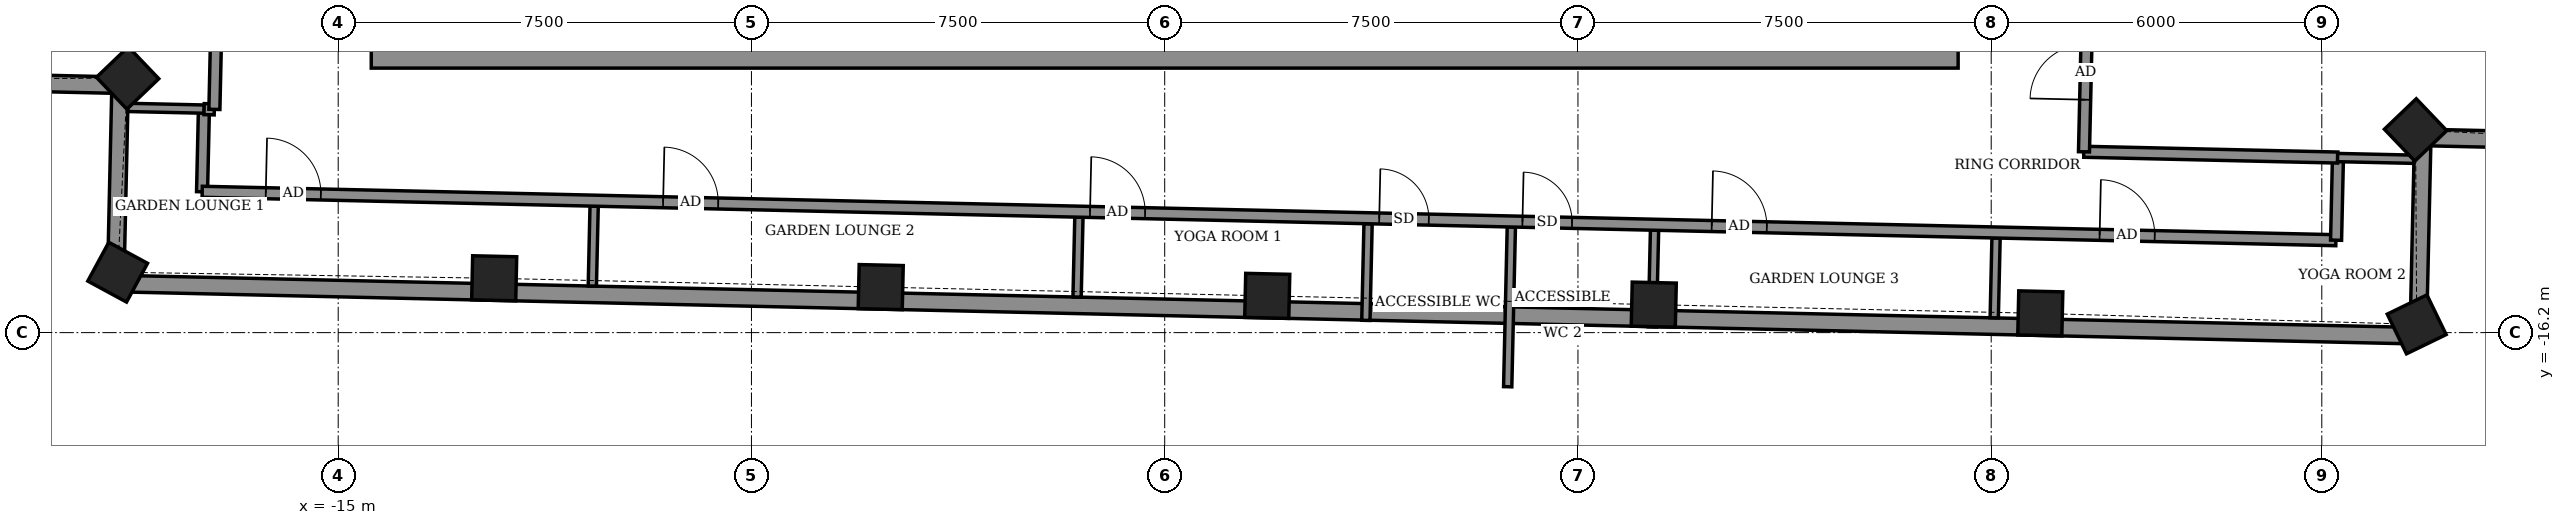
"""IFC4 building model, lengths in metres.
Left out: names, types, materials, properties, quantities, classifications, styles, units other than length and angle.
Written with IfcOpenShell. Run it as: python <this file> out.ifc"""

import sys

from ifc_helpers import new_model, si_unit, direction, frame, frame_2d, origin, origin_2d, place, context, subcontext, project, spatial, rectangle, extrude, element, fill, save


model = new_model("IFC4")
c1 = context("Model", 3, precision=1e-05, world=origin(), true_north=direction((0.0, 1.0)))
c2 = subcontext(c1, "Body", "Model", "MODEL_VIEW")
j1 = project(units=[si_unit("LENGTHUNIT", "METRE"), si_unit("PLANEANGLEUNIT", "RADIAN")], contexts=[c1])
p1 = place(None, origin())
s1 = spatial("IfcSite", under=j1, at=p1, CompositionType="ELEMENT")
p2 = place(p1, origin())
s2 = spatial("IfcBuilding", under=s1, at=p2, CompositionType="ELEMENT")
p3 = place(p2, frame((0.0, 0.0, 350.7)))
s3 = spatial("IfcBuildingStorey", under=s2, at=p3, CompositionType="ELEMENT", Elevation=350.7)
for number, where, z_axis, x_axis in (
    (1, (-18.822, -11.58, -0.55), (0.0, 0.0, 1.0), (0.691, -0.723, 0.0)),
    (2, (-19.002, -15.103, -0.55), (0.0, 0.0, 1.0), (0.879, -0.477, 0.0)),
    (3, (-12.169, -15.214, -0.55), (0.0, 0.0, 1.0), (1.0, -0.023, 0.0)),
    (4, (-5.154, -15.374, -0.55), (0.0, 0.0, 1.0), (1.0, -0.023, 0.0)),
    (5, (1.861, -15.533, -0.55), (0.0, 0.0, 1.0), (1.0, -0.023, 0.0)),
    (6, (8.876, -15.692, -0.55), (0.0, 0.0, 1.0), (1.0, -0.023, 0.0)),
    (7, (15.891, -15.851, -0.55), (0.0, 0.0, 1.0), (1.0, -0.023, 0.0)),
    (8, (22.722, -16.05, -0.55), (0.0, 0.0, 1.0), (0.9, 0.436, 0.0)),
    (9, (22.702, -12.522, -0.55), (0.0, 0.0, 1.0), (0.723, 0.691, 0.0)),
):
    element("IfcColumn", number, at=place(p3, frame(where, z_axis=z_axis, x_axis=x_axis)), inside=s3, PredefinedType="COLUMN", context=c2, shape_type="SweptSolid", body=[
        extrude(rectangle(XDim=0.8, YDim=0.8, at=origin_2d()), origin(), (0.0, 0.0, 1.0), 3.6),
    ])
p4 = place(p3, frame((-22.557, -11.628, 0.0), z_axis=(0.0, 0.0, 1.0), x_axis=(0.999740327787, -0.022787650101, 0.0)))
e10 = element("IfcWall", 10, at=p4, inside=s3, PredefinedType="SOLIDWALL", context=c2, shape_type="SweptSolid", body=[
    extrude(rectangle(XDim=3.6, YDim=0.3, at=frame_2d((1.8, 0.0))), origin(), (0.0, 0.0, 1.0), 2.55),
])
p5 = place(p3, frame((-18.958, -11.71, 0.0), z_axis=(0.0, 0.0, 1.0), x_axis=(-0.022514980321, -0.999746505701, 0.0)))
e11 = element("IfcWall", 11, at=p5, inside=s3, PredefinedType="SOLIDWALL", context=c2, shape_type="SweptSolid", body=[
    extrude(rectangle(XDim=3.6, YDim=0.3, at=frame_2d((1.8, 0.0))), origin(), (0.0, 0.0, 1.0), 2.55),
])
p6 = place(p3, frame((-19.039, -15.309, 0.0), z_axis=(0.0, 0.0, 1.0), x_axis=(0.999742787513, -0.022679480066, 0.0)))
e12 = element("IfcWall", 12, at=p6, inside=s3, PredefinedType="SOLIDWALL", context=c2, shape_type="SweptSolid", body=[
    extrude(rectangle(XDim=41.8, YDim=0.3, at=frame_2d((20.9, 0.0))), origin(), (0.0, 0.0, 1.0), 2.5),
])
p7 = place(p3, frame((22.75, -16.257, 0.0), z_axis=(0.0, 0.0, 1.0), x_axis=(0.02278610514, 0.999740363001, 0.0)))
e13 = element("IfcWall", 13, at=p7, inside=s3, PredefinedType="SOLIDWALL", context=c2, shape_type="SweptSolid", body=[
    extrude(rectangle(XDim=3.6, YDim=0.3, at=frame_2d((1.8, 0.0))), origin(), (0.0, 0.0, 1.0), 2.55),
])
p8 = place(p3, frame((22.832, -12.658, 0.0), z_axis=(0.0, 0.0, 1.0), x_axis=(0.999740327787, -0.022787650101, 0.0)))
e14 = element("IfcWall", 14, at=p8, inside=s3, PredefinedType="SOLIDWALL", context=c2, shape_type="SweptSolid", body=[
    extrude(rectangle(XDim=3.6, YDim=0.3, at=frame_2d((1.8, 0.0))), origin(), (0.0, 0.0, 1.0), 2.55),
])
p9 = place(p3, frame((6.225, -17.182, 0.0), z_axis=(0.0, 0.0, 1.0), x_axis=(0.022732880677, 0.999741574676, 0.0)))
e15 = element("IfcWall", 15, at=p9, inside=s3, PredefinedType="PARTITIONING", context=c2, shape_type="SweptSolid", body=[
    extrude(rectangle(XDim=2.9, YDim=0.15, at=frame_2d((1.45, 0.0))), origin(), (0.0, 0.0, 1.0), 2.5),
])
p10 = place(p3, frame((3.651, -15.978, 0.0), z_axis=(0.0, 0.0, 1.0), x_axis=(0.022822561686, 0.999739531417, 0.0)))
e16 = element("IfcWall", 16, at=p10, inside=s3, PredefinedType="PARTITIONING", context=c2, shape_type="SweptSolid", body=[
    extrude(rectangle(XDim=1.754, YDim=0.15, at=frame_2d((0.877, 0.0))), origin(), (0.0, 0.0, 1.0), 2.5),
])
p11 = place(p3, frame((8.85, -16.096, 0.0), z_axis=(0.0, 0.0, 1.0), x_axis=(0.022683471548, 0.999742696957, 0.0)))
e17 = element("IfcWall", 17, at=p11, inside=s3, PredefinedType="PARTITIONING", context=c2, shape_type="SweptSolid", body=[
    extrude(rectangle(XDim=1.754, YDim=0.15, at=frame_2d((0.877, 0.0))), origin(), (0.0, 0.0, 1.0), 3.05),
])
for number, where, z_axis, x_axis in (
    (18, (-10.388, -15.355, 0.0), (0.0, 0.0, 1.0), (0.023, 1.0, 0.0)),
    (19, (-1.59, -15.555, 0.0), (0.0, 0.0, 1.0), (0.023, 1.0, 0.0)),
):
    element("IfcWall", number, at=place(p3, frame(where, z_axis=z_axis, x_axis=x_axis)), inside=s3, PredefinedType="PARTITIONING", context=c2, shape_type="SweptSolid", body=[
        extrude(rectangle(XDim=1.45, YDim=0.15, at=frame_2d((0.725, 0.0))), origin(), (0.0, 0.0, 1.0), 2.5),
    ])
p12 = place(p3, frame((15.055, -15.932, 0.0), z_axis=(0.0, 0.0, 1.0), x_axis=(0.022740537333, 0.999741400544, 0.0)))
e20 = element("IfcWall", 20, at=p12, inside=s3, PredefinedType="PARTITIONING", context=c2, shape_type="SweptSolid", body=[
    extrude(rectangle(XDim=1.449, YDim=0.15, at=frame_2d((0.725, 0.0))), origin(), (0.0, 0.0, 1.0), 2.5),
])
p13 = place(p3, frame((-17.471, -13.644, 0.0), z_axis=(0.0, 0.0, 1.0), x_axis=(0.022617910375, 0.999744182344, 0.0)))
e21 = element("IfcWall", 21, at=p13, inside=s3, PredefinedType="PARTITIONING", context=c2, shape_type="SweptSolid", body=[
    extrude(rectangle(XDim=1.5, YDim=0.2, at=frame_2d((0.75, 0.0))), origin(), (0.0, 0.0, 1.0), 3.05),
])
p14 = place(p3, frame((-17.468, -13.644, 0.0), z_axis=(0.0, 0.0, 1.0), x_axis=(0.999742531431, -0.022690765715, 0.0)))
e22 = element("IfcWall", 22, at=p14, inside=s3, PredefinedType="PARTITIONING", context=c2, shape_type="SweptSolid", body=[
    extrude(rectangle(XDim=38.734, YDim=0.2, at=frame_2d((19.367, 0.0))), origin(), (0.0, 0.0, 1.0), 3.05),
])
p15 = place(p14, frame((1.154, 0.0, 0.0)))
e23 = element("IfcOpeningElement", 23, at=p15, cuts=e22, PredefinedType="OPENING", context=c2, shape_type="SweptSolid", body=[
    extrude(rectangle(XDim=1.0, YDim=2.1, at=frame_2d((0.5, 1.05))), frame((0.0, 0.11, 0.0), z_axis=(0.0, -1.0, 0.0), x_axis=(1.0, 0.0, 0.0)), (0.0, 0.0, 1.0), 0.22),
])
p16 = place(p14, frame((8.367, 0.0, 0.0)))
e24 = element("IfcOpeningElement", 24, at=p16, cuts=e22, PredefinedType="OPENING", context=c2, shape_type="SweptSolid", body=[
    extrude(rectangle(XDim=1.0, YDim=2.1, at=frame_2d((0.5, 1.05))), frame((0.0, 0.11, 0.0), z_axis=(0.0, -1.0, 0.0), x_axis=(1.0, 0.0, 0.0)), (0.0, 0.0, 1.0), 0.22),
])
p17 = place(p14, frame((16.117, 0.0, 0.0)))
e25 = element("IfcOpeningElement", 25, at=p17, cuts=e22, PredefinedType="OPENING", context=c2, shape_type="SweptSolid", body=[
    extrude(rectangle(XDim=1.0, YDim=2.1, at=frame_2d((0.5, 1.05))), frame((0.0, 0.11, 0.0), z_axis=(0.0, -1.0, 0.0), x_axis=(1.0, 0.0, 0.0)), (0.0, 0.0, 1.0), 0.22),
])
p18 = place(p14, frame((21.367, 0.0, 0.0)))
e26 = element("IfcOpeningElement", 26, at=p18, cuts=e22, PredefinedType="OPENING", context=c2, shape_type="SweptSolid", body=[
    extrude(rectangle(XDim=0.9, YDim=2.1, at=frame_2d((0.45, 1.05))), frame((0.0, 0.11, 0.0), z_axis=(0.0, -1.0, 0.0), x_axis=(1.0, 0.0, 0.0)), (0.0, 0.0, 1.0), 0.22),
])
p19 = place(p14, frame((27.403, 0.0, 0.0)))
e27 = element("IfcOpeningElement", 27, at=p19, cuts=e22, PredefinedType="OPENING", context=c2, shape_type="SweptSolid", body=[
    extrude(rectangle(XDim=1.0, YDim=2.1, at=frame_2d((0.5, 1.05))), frame((0.0, 0.11, 0.0), z_axis=(0.0, -1.0, 0.0), x_axis=(1.0, 0.0, 0.0)), (0.0, 0.0, 1.0), 0.22),
])
p20 = place(p14, frame((23.967, 0.0, 0.0)))
e28 = element("IfcOpeningElement", 28, at=p20, cuts=e22, PredefinedType="OPENING", context=c2, shape_type="SweptSolid", body=[
    extrude(rectangle(XDim=0.9, YDim=2.1, at=frame_2d((0.45, 1.05))), frame((0.0, 0.11, 0.0), z_axis=(0.0, -1.0, 0.0), x_axis=(1.0, 0.0, 0.0)), (0.0, 0.0, 1.0), 0.22),
])
p21 = place(p14, frame((34.445, 0.0, 0.0)))
e29 = element("IfcOpeningElement", 29, at=p21, cuts=e22, PredefinedType="OPENING", context=c2, shape_type="SweptSolid", body=[
    extrude(rectangle(XDim=1.0, YDim=2.1, at=frame_2d((0.5, 1.05))), frame((0.0, 0.11, 0.0), z_axis=(0.0, -1.0, 0.0), x_axis=(1.0, 0.0, 0.0)), (0.0, 0.0, 1.0), 0.22),
])
p22 = place(p3, frame((21.259, -14.523, 0.0), z_axis=(0.0, 0.0, 1.0), x_axis=(0.022617910375, 0.999744182344, 0.0)))
e30 = element("IfcWall", 30, at=p22, inside=s3, PredefinedType="PARTITIONING", context=c2, shape_type="SweptSolid", body=[
    extrude(rectangle(XDim=1.5, YDim=0.2, at=frame_2d((0.75, 0.0))), origin(), (0.0, 0.0, 1.0), 3.05),
])
p23 = place(p3, frame((-18.817, -12.113, 0.0), z_axis=(0.0, 0.0, 1.0), x_axis=(0.999750215708, -0.022349635169, 0.0)))
e31 = element("IfcWall", 31, at=p23, inside=s3, PredefinedType="PARTITIONING", context=c2, shape_type="SweptSolid", body=[
    extrude(rectangle(XDim=1.387, YDim=0.15, at=frame_2d((0.694, 0.0))), origin(), (0.0, 0.0, 1.0), 2.55),
])
p24 = place(p3, frame((-17.434, -12.144, 0.0), z_axis=(0.0, 0.0, 1.0), x_axis=(0.999655732728, -0.026237683274, 0.0)))
e32 = element("IfcWall", 32, at=p24, inside=s3, PredefinedType="PARTITIONING", context=c2, shape_type="SweptSolid", body=[
    extrude(rectangle(XDim=0.186, YDim=0.2, at=frame_2d((0.093, 0.0))), origin(), (0.0, 0.0, 1.0), 3.05),
])
p25 = place(p3, frame((-17.247, -12.149, 0.0), z_axis=(0.0, 0.0, 1.0), x_axis=(0.022696191528, 0.999742408268, 0.0)))
e33 = element("IfcWall", 33, at=p25, inside=s3, PredefinedType="PARTITIONING", context=c2, shape_type="SweptSolid", body=[
    extrude(rectangle(XDim=25.074, YDim=0.2, at=frame_2d((12.537, 0.0))), origin(), (0.0, 0.0, 1.0), 3.05),
])
p26 = place(p25, frame((23.874, 0.0, 0.0)))
e34 = element("IfcOpeningElement", 34, at=p26, cuts=e33, PredefinedType="OPENING", context=c2, shape_type="SweptSolid", body=[
    extrude(rectangle(XDim=1.0, YDim=2.1, at=frame_2d((0.5, 1.05))), frame((0.0, 0.11, 0.0), z_axis=(0.0, -1.0, 0.0), x_axis=(1.0, 0.0, 0.0)), (0.0, 0.0, 1.0), 0.22),
])
p27 = place(p25, frame((18.896, 0.0, 0.0)))
e35 = element("IfcOpeningElement", 35, at=p27, cuts=e33, PredefinedType="OPENING", context=c2, shape_type="SweptSolid", body=[
    extrude(rectangle(XDim=1.0, YDim=2.1, at=frame_2d((0.5, 1.05))), frame((0.0, 0.11, 0.0), z_axis=(0.0, -1.0, 0.0), x_axis=(1.0, 0.0, 0.0)), (0.0, 0.0, 1.0), 0.22),
])
p28 = place(p25, frame((12.675, 0.0, 0.0)))
e36 = element("IfcOpeningElement", 36, at=p28, cuts=e33, PredefinedType="OPENING", context=c2, shape_type="SweptSolid", body=[
    extrude(rectangle(XDim=1.0, YDim=2.1, at=frame_2d((0.5, 1.05))), frame((0.0, 0.11, 0.0), z_axis=(0.0, -1.0, 0.0), x_axis=(1.0, 0.0, 0.0)), (0.0, 0.0, 1.0), 0.22),
])
p29 = place(p25, frame((8.775, 0.0, 0.0)))
e37 = element("IfcOpeningElement", 37, at=p29, cuts=e33, PredefinedType="OPENING", context=c2, shape_type="SweptSolid", body=[
    extrude(rectangle(XDim=0.9, YDim=2.1, at=frame_2d((0.45, 1.05))), frame((0.0, 0.11, 0.0), z_axis=(0.0, -1.0, 0.0), x_axis=(1.0, 0.0, 0.0)), (0.0, 0.0, 1.0), 0.22),
])
p30 = place(p25, frame((5.045, 0.0, 0.0)))
e38 = element("IfcOpeningElement", 38, at=p30, cuts=e33, PredefinedType="OPENING", context=c2, shape_type="SweptSolid", body=[
    extrude(rectangle(XDim=1.0, YDim=2.1, at=frame_2d((0.5, 1.05))), frame((0.0, 0.11, 0.0), z_axis=(0.0, -1.0, 0.0), x_axis=(1.0, 0.0, 0.0)), (0.0, 0.0, 1.0), 0.22),
])
p31 = place(p3, frame((16.679, -12.918, 0.0), z_axis=(0.0, 0.0, 1.0), x_axis=(0.99974093296, -0.022761084406, 0.0)))
e39 = element("IfcWall", 39, at=p31, inside=s3, PredefinedType="PARTITIONING", context=c2, shape_type="SweptSolid", body=[
    extrude(rectangle(XDim=4.612, YDim=0.2, at=frame_2d((2.306, 0.0))), origin(), (0.0, 0.0, 1.0), 3.05),
])
p32 = place(p3, frame((16.684, -12.919, 0.0), z_axis=(0.0, 0.0, 1.0), x_axis=(0.022667483124, 0.999743059595, 0.0)))
e40 = element("IfcWall", 40, at=p32, inside=s3, PredefinedType="PARTITIONING", context=c2, shape_type="SweptSolid", body=[
    extrude(rectangle(XDim=5.245, YDim=0.2, at=frame_2d((2.623, 0.0))), origin(), (0.0, 0.0, 1.0), 3.05),
])
p33 = place(p32, frame((0.946, 0.0, 0.0)))
e41 = element("IfcOpeningElement", 41, at=p33, cuts=e40, PredefinedType="OPENING", context=c2, shape_type="SweptSolid", body=[
    extrude(rectangle(XDim=1.0, YDim=2.1, at=frame_2d((0.5, 1.05))), frame((0.0, 0.11, 0.0), z_axis=(0.0, -1.0, 0.0), x_axis=(1.0, 0.0, 0.0)), (0.0, 0.0, 1.0), 0.22),
])
p34 = place(p3, frame((21.286, -13.023, 0.0), z_axis=(0.0, 0.0, 1.0), x_axis=(0.999750303588, -0.022345703723, 0.0)))
e42 = element("IfcWall", 42, at=p34, inside=s3, PredefinedType="PARTITIONING", context=c2, shape_type="SweptSolid", body=[
    extrude(rectangle(XDim=1.387, YDim=0.15, at=frame_2d((0.694, 0.0))), origin(), (0.0, 0.0, 1.0), 2.55),
])
p35 = place(p3, frame((-14.4, -11.1, 0.0), z_axis=(0.0, 0.0, 1.0), x_axis=(1.0, 0.0, 0.0)))
e43 = element("IfcWall", 43, at=p35, inside=s3, PredefinedType="SHEAR", context=c2, shape_type="SweptSolid", body=[
    extrude(rectangle(XDim=28.8, YDim=0.6, at=frame_2d((14.4, 0.0))), origin(), (0.0, 0.0, 1.0), 3.6),
])
p36 = place(p15, origin())
e44 = element("IfcDoor", 44, at=p36, inside=s3, OperationType="SINGLE_SWING_LEFT", PredefinedType="DOOR", context=c2, shape_type="SweptSolid", body=[
    extrude(rectangle(XDim=1.0, YDim=2.1, at=frame_2d((0.5, 1.05))), frame((0.0, 0.025, 0.0), z_axis=(0.0, -1.0, 0.0), x_axis=(1.0, 0.0, 0.0)), (0.0, 0.0, 1.0), 0.05),
])
fill(e23, e44)
p37 = place(p16, origin())
e45 = element("IfcDoor", 45, at=p37, inside=s3, OperationType="SINGLE_SWING_RIGHT", PredefinedType="DOOR", context=c2, shape_type="SweptSolid", body=[
    extrude(rectangle(XDim=1.0, YDim=2.1, at=frame_2d((0.5, 1.05))), frame((0.0, 0.025, 0.0), z_axis=(0.0, -1.0, 0.0), x_axis=(1.0, 0.0, 0.0)), (0.0, 0.0, 1.0), 0.05),
])
fill(e24, e45)
p38 = place(p17, origin())
e46 = element("IfcDoor", 46, at=p38, inside=s3, OperationType="SINGLE_SWING_LEFT", PredefinedType="DOOR", context=c2, shape_type="SweptSolid", body=[
    extrude(rectangle(XDim=1.0, YDim=2.1, at=frame_2d((0.5, 1.05))), frame((0.0, 0.025, 0.0), z_axis=(0.0, -1.0, 0.0), x_axis=(1.0, 0.0, 0.0)), (0.0, 0.0, 1.0), 0.05),
])
fill(e25, e46)
p39 = place(p18, origin())
e47 = element("IfcDoor", 47, at=p39, inside=s3, OperationType="SINGLE_SWING_LEFT", PredefinedType="DOOR", context=c2, shape_type="SweptSolid", body=[
    extrude(rectangle(XDim=0.9, YDim=2.1, at=frame_2d((0.45, 1.05))), frame((0.0, 0.025, 0.0), z_axis=(0.0, -1.0, 0.0), x_axis=(1.0, 0.0, 0.0)), (0.0, 0.0, 1.0), 0.05),
])
fill(e26, e47)
p40 = place(p19, origin())
e48 = element("IfcDoor", 48, at=p40, inside=s3, OperationType="SINGLE_SWING_RIGHT", PredefinedType="DOOR", context=c2, shape_type="SweptSolid", body=[
    extrude(rectangle(XDim=1.0, YDim=2.1, at=frame_2d((0.5, 1.05))), frame((0.0, 0.025, 0.0), z_axis=(0.0, -1.0, 0.0), x_axis=(1.0, 0.0, 0.0)), (0.0, 0.0, 1.0), 0.05),
])
fill(e27, e48)
p41 = place(p20, origin())
e49 = element("IfcDoor", 49, at=p41, inside=s3, OperationType="SINGLE_SWING_RIGHT", PredefinedType="DOOR", context=c2, shape_type="SweptSolid", body=[
    extrude(rectangle(XDim=0.9, YDim=2.1, at=frame_2d((0.45, 1.05))), frame((0.0, 0.025, 0.0), z_axis=(0.0, -1.0, 0.0), x_axis=(1.0, 0.0, 0.0)), (0.0, 0.0, 1.0), 0.05),
])
fill(e28, e49)
p42 = place(p21, origin())
e50 = element("IfcDoor", 50, at=p42, inside=s3, OperationType="SINGLE_SWING_LEFT", PredefinedType="DOOR", context=c2, shape_type="SweptSolid", body=[
    extrude(rectangle(XDim=1.0, YDim=2.1, at=frame_2d((0.5, 1.05))), frame((0.0, 0.025, 0.0), z_axis=(0.0, -1.0, 0.0), x_axis=(1.0, 0.0, 0.0)), (0.0, 0.0, 1.0), 0.05),
])
fill(e29, e50)
p43 = place(p33, origin())
e51 = element("IfcDoor", 51, at=p43, inside=s3, OperationType="SINGLE_SWING_RIGHT", PredefinedType="DOOR", context=c2, shape_type="SweptSolid", body=[
    extrude(rectangle(XDim=1.0, YDim=2.1, at=frame_2d((0.5, 1.05))), frame((0.0, 0.025, 0.0), z_axis=(0.0, -1.0, 0.0), x_axis=(1.0, 0.0, 0.0)), (0.0, 0.0, 1.0), 0.05),
])
fill(e41, e51)
save(model, sys.argv[1])
